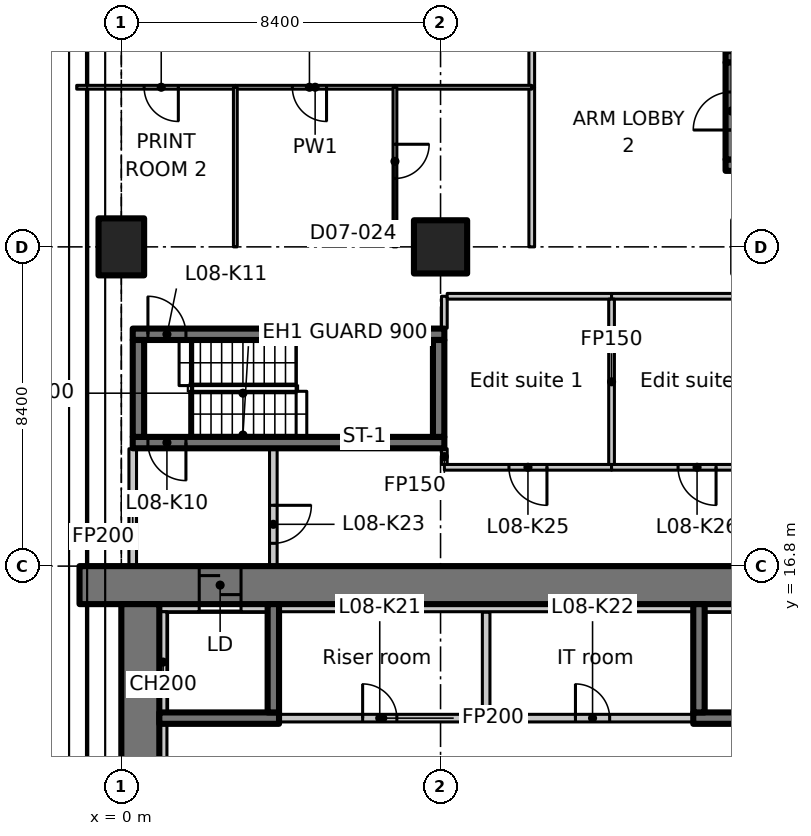
"""IFC4 building model, lengths in metres.
Left out: names, types, materials, properties, quantities, classifications, styles, units other than length and angle.
Written with IfcOpenShell. Run it as: python <this file> out.ifc"""

import sys

from ifc_helpers import new_model, si_unit, direction, frame, frame_2d, origin, origin_2d, place, context, subcontext, project, spatial, rectangle, extrude, element, fill, save


model = new_model("IFC4")
c1 = context("Model", 3, precision=1e-05, world=origin(), true_north=direction((0.0, 1.0)))
c2 = subcontext(c1, "Body", "Model", "MODEL_VIEW")
j1 = project(units=[si_unit("LENGTHUNIT", "METRE"), si_unit("PLANEANGLEUNIT", "RADIAN")], contexts=[c1])
p1 = place(None, origin())
s1 = spatial("IfcSite", under=j1, at=p1, CompositionType="ELEMENT")
p2 = place(p1, origin())
s2 = spatial("IfcBuilding", under=s1, at=p2, CompositionType="ELEMENT")
p3 = place(p2, frame((0.0, 0.0, 43.7)))
s3 = spatial("IfcBuildingStorey", under=s2, at=p3, CompositionType="ELEMENT", Elevation=43.7)
p4 = place(p3, frame((0.0, 25.2, 0.0), z_axis=(0.0, 0.0, 1.0), x_axis=(1.0, 0.0, 0.0)))
e1 = element("IfcColumn", 1, at=p4, inside=s3, PredefinedType="COLUMN", context=c2, shape_type="SweptSolid", body=[
    extrude(rectangle(XDim=1.2, YDim=1.5, at=origin_2d()), origin(), (0.0, 0.0, 1.0), 3.35),
])
p5 = place(p3, frame((8.4, 25.2, 0.0), z_axis=(0.0, 0.0, 1.0), x_axis=(1.0, 0.0, 0.0)))
e2 = element("IfcColumn", 2, at=p5, inside=s3, PredefinedType="COLUMN", context=c2, shape_type="SweptSolid", body=[
    extrude(rectangle(XDim=1.4, YDim=1.4, at=origin_2d()), origin(), (0.0, 0.0, 1.0), 3.35),
])
p6 = place(p3, frame((-1.1, 16.3, 0.0), z_axis=(0.0, 0.0, 1.0), x_axis=(1.0, 0.0, 0.0)))
e3 = element("IfcWall", 3, at=p6, inside=s3, PredefinedType="SHEAR", context=c2, shape_type="SweptSolid", body=[
    extrude(rectangle(XDim=22.1, YDim=1.0, at=frame_2d((11.05, 0.0))), origin(), (0.0, 0.0, 1.0), 3.35),
])
p7 = place(p6, frame((3.15, 0.0, 0.0)))
e4 = element("IfcOpeningElement", 4, at=p7, cuts=e3, PredefinedType="OPENING", context=c2, shape_type="SweptSolid", body=[
    extrude(rectangle(XDim=1.1, YDim=2.3, at=frame_2d((0.55, 1.15))), frame((0.0, 0.51, 0.0), z_axis=(0.0, -1.0, 0.0), x_axis=(1.0, 0.0, 0.0)), (0.0, 0.0, 1.0), 1.02),
])
p8 = place(p3, frame((0.5, 6.936, 0.0), z_axis=(0.0, 0.0, 1.0), x_axis=(0.0, 1.0, 0.0)))
e5 = element("IfcWall", 5, at=p8, inside=s3, PredefinedType="SHEAR", context=c2, shape_type="SweptSolid", body=[
    extrude(rectangle(XDim=8.864, YDim=1.0, at=frame_2d((4.432, 0.0))), origin(), (0.0, 0.0, 1.0), 3.35),
])
p9 = place(p3, frame((1.0, 15.7, 0.0), z_axis=(0.0, 0.0, 1.0), x_axis=(1.0, 0.0, 0.0)))
e6 = element("IfcWall", 6, at=p9, inside=s3, PredefinedType="PARTITIONING", context=c2, shape_type="SweptSolid", body=[
    extrude(rectangle(XDim=1.05, YDim=0.2, at=frame_2d((0.525, 0.0))), origin(), (0.0, 0.0, 1.0), 3.35),
])
p10 = place(p3, frame((1.0, 12.8, 0.0), z_axis=(0.0, 0.0, 1.0), x_axis=(1.0, 0.0, 0.0)))
e7 = element("IfcWall", 7, at=p10, inside=s3, PredefinedType="SHEAR", context=c2, shape_type="SweptSolid", body=[
    extrude(rectangle(XDim=3.15, YDim=0.3, at=frame_2d((1.575, 0.0))), origin(), (0.0, 0.0, 1.0), 3.35),
])
p11 = place(p3, frame((4.0, 12.95, 0.0), z_axis=(0.0, 0.0, 1.0), x_axis=(0.0, 1.0, 0.0)))
e8 = element("IfcWall", 8, at=p11, inside=s3, PredefinedType="SHEAR", context=c2, shape_type="SweptSolid", body=[
    extrude(rectangle(XDim=2.85, YDim=0.3, at=frame_2d((1.425, 0.0))), origin(), (0.0, 0.0, 1.0), 3.35),
])
p12 = place(p3, frame((15.05, 12.8, 0.0), z_axis=(0.0, 0.0, 1.0), x_axis=(1.0, 0.0, 0.0)))
e9 = element("IfcWall", 9, at=p12, inside=s3, PredefinedType="SHEAR", context=c2, shape_type="SweptSolid", body=[
    extrude(rectangle(XDim=5.9, YDim=0.3, at=frame_2d((2.95, 0.0))), origin(), (0.0, 0.0, 1.0), 3.35),
])
p13 = place(p12, frame((3.8, 0.0, 0.0)))
e10 = element("IfcOpeningElement", 10, at=p13, cuts=e9, PredefinedType="OPENING", context=c2, shape_type="SweptSolid", body=[
    extrude(rectangle(XDim=1.1, YDim=2.3, at=frame_2d((0.55, 1.15))), frame((0.0, 0.16, 0.0), z_axis=(0.0, -1.0, 0.0), x_axis=(1.0, 0.0, 0.0)), (0.0, 0.0, 1.0), 0.32),
])
p14 = place(p3, frame((15.2, 12.95, 0.0), z_axis=(0.0, 0.0, 1.0), x_axis=(0.0, 1.0, 0.0)))
e11 = element("IfcWall", 11, at=p14, inside=s3, PredefinedType="SHEAR", context=c2, shape_type="SweptSolid", body=[
    extrude(rectangle(XDim=2.85, YDim=0.3, at=frame_2d((1.425, 0.0))), origin(), (0.0, 0.0, 1.0), 3.35),
])
p15 = place(p3, frame((8.5, 20.05, 0.0), z_axis=(0.0, 0.0, 1.0), x_axis=(-1.0, 0.0, 0.0)))
e12 = element("IfcWall", 12, at=p15, inside=s3, PredefinedType="SHEAR", context=c2, shape_type="SweptSolid", body=[
    extrude(rectangle(XDim=8.2, YDim=0.3, at=frame_2d((4.1, 0.0))), origin(), (0.0, 0.0, 1.0), 3.35),
])
p16 = place(p15, frame((6.8, 0.0, 0.0)))
e13 = element("IfcOpeningElement", 13, at=p16, cuts=e12, PredefinedType="OPENING", context=c2, shape_type="SweptSolid", body=[
    extrude(rectangle(XDim=1.0, YDim=2.1, at=frame_2d((0.5, 1.05))), frame((0.0, 0.16, 0.0), z_axis=(0.0, -1.0, 0.0), x_axis=(1.0, 0.0, 0.0)), (0.0, 0.0, 1.0), 0.32),
])
p17 = place(p3, frame((0.3, 22.9, 0.0), z_axis=(0.0, 0.0, 1.0), x_axis=(1.0, 0.0, 0.0)))
e14 = element("IfcWall", 14, at=p17, inside=s3, PredefinedType="SHEAR", context=c2, shape_type="SweptSolid", body=[
    extrude(rectangle(XDim=8.2, YDim=0.3, at=frame_2d((4.1, 0.0))), origin(), (0.0, 0.0, 1.0), 3.35),
])
p18 = place(p17, frame((0.4, 0.0, 0.0)))
e15 = element("IfcOpeningElement", 15, at=p18, cuts=e14, PredefinedType="OPENING", context=c2, shape_type="SweptSolid", body=[
    extrude(rectangle(XDim=1.0, YDim=2.1, at=frame_2d((0.5, 1.05))), frame((0.0, 0.16, 0.0), z_axis=(0.0, -1.0, 0.0), x_axis=(1.0, 0.0, 0.0)), (0.0, 0.0, 1.0), 0.32),
])
for number, where, z_axis, x_axis in (
    (16, (0.45, 20.2, 0.0), (0.0, 0.0, 1.0), (0.0, 1.0, 0.0)),
    (17, (8.35, 20.2, 0.0), (0.0, 0.0, 1.0), (0.0, 1.0, 0.0)),
):
    element("IfcWall", number, at=place(p3, frame(where, z_axis=z_axis, x_axis=x_axis)), inside=s3, PredefinedType="SHEAR", context=c2, shape_type="SweptSolid", body=[
        extrude(rectangle(XDim=2.55, YDim=0.3, at=frame_2d((1.275, 0.0))), origin(), (0.0, 0.0, 1.0), 3.35),
    ])
for number, where, z_axis, x_axis in (
    (18, (15.9, 27.35, 0.0), (0.0, 0.0, 1.0), (1.0, 0.0, 0.0)),
    (19, (15.9, 30.2, 0.0), (0.0, 0.0, 1.0), (1.0, 0.0, 0.0)),
):
    element("IfcWall", number, at=place(p3, frame(where, z_axis=z_axis, x_axis=x_axis)), inside=s3, PredefinedType="SHEAR", context=c2, shape_type="SweptSolid", body=[
        extrude(rectangle(XDim=8.2, YDim=0.3, at=frame_2d((4.1, 0.0))), origin(), (0.0, 0.0, 1.0), 3.35),
    ])
p19 = place(p3, frame((16.05, 27.5, 0.0), z_axis=(0.0, 0.0, 1.0), x_axis=(0.0, 1.0, 0.0)))
e20 = element("IfcWall", 20, at=p19, inside=s3, PredefinedType="SHEAR", context=c2, shape_type="SweptSolid", body=[
    extrude(rectangle(XDim=2.55, YDim=0.3, at=frame_2d((1.275, 0.0))), origin(), (0.0, 0.0, 1.0), 3.35),
])
p20 = place(p19, frame((0.775, 0.0, 0.0)))
e21 = element("IfcOpeningElement", 21, at=p20, cuts=e20, PredefinedType="OPENING", context=c2, shape_type="SweptSolid", body=[
    extrude(rectangle(XDim=1.0, YDim=2.1, at=frame_2d((0.5, 1.05))), frame((0.0, 0.16, 0.0), z_axis=(0.0, -1.0, 0.0), x_axis=(1.0, 0.0, 0.0)), (0.0, 0.0, 1.0), 0.32),
])
p21 = place(p3, frame((0.3, 16.812, 0.0), z_axis=(0.0, 0.0, 1.0), x_axis=(0.0, 1.0, 0.0)))
e22 = element("IfcWall", 22, at=p21, inside=s3, PredefinedType="PARTITIONING", context=c2, shape_type="SweptSolid", body=[
    extrude(rectangle(XDim=3.076, YDim=0.2, at=frame_2d((1.538, 0.0))), origin(), (0.0, 0.0, 1.0), 2.98),
])
p22 = place(p3, frame((4.0, 19.888, 0.0), z_axis=(0.0, 0.0, 1.0), x_axis=(0.0, -1.0, 0.0)))
e23 = element("IfcWall", 23, at=p22, inside=s3, PredefinedType="PARTITIONING", context=c2, shape_type="SweptSolid", body=[
    extrude(rectangle(XDim=3.076, YDim=0.2, at=frame_2d((1.538, 0.0))), origin(), (0.0, 0.0, 1.0), 3.35),
])
p23 = place(p22, frame((1.488, 0.0, 0.0)))
e24 = element("IfcOpeningElement", 24, at=p23, cuts=e23, PredefinedType="OPENING", context=c2, shape_type="SweptSolid", body=[
    extrude(rectangle(XDim=1.0, YDim=2.1, at=frame_2d((0.5, 1.05))), frame((0.0, 0.11, 0.0), z_axis=(0.0, -1.0, 0.0), x_axis=(1.0, 0.0, 0.0)), (0.0, 0.0, 1.0), 0.22),
])
p24 = place(p3, frame((4.162, 12.8, 0.0), z_axis=(0.0, 0.0, 1.0), x_axis=(1.0, 0.0, 0.0)))
e25 = element("IfcWall", 25, at=p24, inside=s3, PredefinedType="PARTITIONING", context=c2, shape_type="SweptSolid", body=[
    extrude(rectangle(XDim=5.438, YDim=0.2, at=frame_2d((2.719, 0.0))), origin(), (0.0, 0.0, 1.0), 3.35),
])
p25 = place(p24, frame((2.188, 0.0, 0.0)))
e26 = element("IfcOpeningElement", 26, at=p25, cuts=e25, PredefinedType="OPENING", context=c2, shape_type="SweptSolid", body=[
    extrude(rectangle(XDim=0.9, YDim=2.1, at=frame_2d((0.45, 1.05))), frame((0.0, 0.11, 0.0), z_axis=(0.0, -1.0, 0.0), x_axis=(1.0, 0.0, 0.0)), (0.0, 0.0, 1.0), 0.22),
])
p26 = place(p3, frame((9.6, 12.8, 0.0), z_axis=(0.0, 0.0, 1.0), x_axis=(1.0, 0.0, 0.0)))
e27 = element("IfcWall", 27, at=p26, inside=s3, PredefinedType="PARTITIONING", context=c2, shape_type="SweptSolid", body=[
    extrude(rectangle(XDim=5.438, YDim=0.2, at=frame_2d((2.719, 0.0))), origin(), (0.0, 0.0, 1.0), 3.35),
])
p27 = place(p26, frame((2.35, 0.0, 0.0)))
e28 = element("IfcOpeningElement", 28, at=p27, cuts=e27, PredefinedType="OPENING", context=c2, shape_type="SweptSolid", body=[
    extrude(rectangle(XDim=0.9, YDim=2.1, at=frame_2d((0.45, 1.05))), frame((0.0, 0.11, 0.0), z_axis=(0.0, -1.0, 0.0), x_axis=(1.0, 0.0, 0.0)), (0.0, 0.0, 1.0), 0.22),
])
p28 = place(p3, frame((9.6, 15.588, 0.0), z_axis=(0.0, 0.0, 1.0), x_axis=(0.0, -1.0, 0.0)))
e29 = element("IfcWall", 29, at=p28, inside=s3, PredefinedType="PARTITIONING", context=c2, shape_type="SweptSolid", body=[
    extrude(rectangle(XDim=2.688, YDim=0.2, at=frame_2d((1.344, 0.0))), origin(), (0.0, 0.0, 1.0), 3.35),
])
p29 = place(p3, frame((12.9, 19.4, 0.0), z_axis=(0.0, 0.0, 1.0), x_axis=(-1.0, 0.0, 0.0)))
e30 = element("IfcWall", 30, at=p29, inside=s3, PredefinedType="PARTITIONING", context=c2, shape_type="SweptSolid", body=[
    extrude(rectangle(XDim=4.4, YDim=0.15, at=frame_2d((2.2, 0.0))), origin(), (0.0, 0.0, 1.0), 3.35),
])
p30 = place(p29, frame((1.7, 0.0, 0.0)))
e31 = element("IfcOpeningElement", 31, at=p30, cuts=e30, PredefinedType="OPENING", context=c2, shape_type="SweptSolid", body=[
    extrude(rectangle(XDim=1.0, YDim=2.1, at=frame_2d((0.5, 1.05))), frame((0.0, 0.085, 0.0), z_axis=(0.0, -1.0, 0.0), x_axis=(1.0, 0.0, 0.0)), (0.0, 0.0, 1.0), 0.17),
])
p31 = place(p3, frame((8.5, 19.475, 0.0), z_axis=(0.0, 0.0, 1.0), x_axis=(0.0, 1.0, 0.0)))
e32 = element("IfcWall", 32, at=p31, inside=s3, PredefinedType="PARTITIONING", context=c2, shape_type="SweptSolid", body=[
    extrude(rectangle(XDim=0.413, YDim=0.15, at=frame_2d((0.207, 0.0))), origin(), (0.0, 0.0, 1.0), 3.35),
])
p32 = place(p3, frame((8.5, 23.062, 0.0), z_axis=(0.0, 0.0, 1.0), x_axis=(0.0, 1.0, 0.0)))
e33 = element("IfcWall", 33, at=p32, inside=s3, PredefinedType="PARTITIONING", context=c2, shape_type="SweptSolid", body=[
    extrude(rectangle(XDim=0.838, YDim=0.15, at=frame_2d((0.419, 0.0))), origin(), (0.0, 0.0, 1.0), 3.35),
])
p33 = place(p3, frame((8.575, 23.9, 0.0), z_axis=(0.0, 0.0, 1.0), x_axis=(1.0, 0.0, 0.0)))
e34 = element("IfcWall", 34, at=p33, inside=s3, PredefinedType="PARTITIONING", context=c2, shape_type="SweptSolid", body=[
    extrude(rectangle(XDim=4.325, YDim=0.15, at=frame_2d((2.163, 0.0))), origin(), (0.0, 0.0, 1.0), 3.35),
])
p34 = place(p3, frame((12.9, 23.9, 0.0), z_axis=(0.0, 0.0, 1.0), x_axis=(1.0, 0.0, 0.0)))
e35 = element("IfcWall", 35, at=p34, inside=s3, PredefinedType="PARTITIONING", context=c2, shape_type="SweptSolid", body=[
    extrude(rectangle(XDim=4.5, YDim=0.15, at=frame_2d((2.25, 0.0))), origin(), (0.0, 0.0, 1.0), 3.35),
])
p35 = place(p3, frame((17.325, 19.4, 0.0), z_axis=(0.0, 0.0, 1.0), x_axis=(-1.0, 0.0, 0.0)))
e36 = element("IfcWall", 36, at=p35, inside=s3, PredefinedType="PARTITIONING", context=c2, shape_type="SweptSolid", body=[
    extrude(rectangle(XDim=4.425, YDim=0.15, at=frame_2d((2.212, 0.0))), origin(), (0.0, 0.0, 1.0), 3.35),
])
p36 = place(p35, frame((1.675, 0.0, 0.0)))
e37 = element("IfcOpeningElement", 37, at=p36, cuts=e36, PredefinedType="OPENING", context=c2, shape_type="SweptSolid", body=[
    extrude(rectangle(XDim=1.0, YDim=2.1, at=frame_2d((0.5, 1.05))), frame((0.0, 0.085, 0.0), z_axis=(0.0, -1.0, 0.0), x_axis=(1.0, 0.0, 0.0)), (0.0, 0.0, 1.0), 0.17),
])
p37 = place(p3, frame((12.9, 23.825, 0.0), z_axis=(0.0, 0.0, 1.0), x_axis=(0.0, -1.0, 0.0)))
e38 = element("IfcWall", 38, at=p37, inside=s3, PredefinedType="PARTITIONING", context=c2, shape_type="SweptSolid", body=[
    extrude(rectangle(XDim=4.35, YDim=0.15, at=frame_2d((2.175, 0.0))), origin(), (0.0, 0.0, 1.0), 3.35),
])
p38 = place(p3, frame((1.1, 9.75, 0.0), z_axis=(0.0, 0.0, 1.0), x_axis=(0.0, 1.0, 0.0)))
e39 = element("IfcWall", 39, at=p38, inside=s3, PredefinedType="PARTITIONING", context=c2, shape_type="SweptSolid", body=[
    extrude(rectangle(XDim=2.9, YDim=0.2, at=frame_2d((1.45, 0.0))), origin(), (0.0, 0.0, 1.0), 3.35),
])
p39 = place(p3, frame((1.1, 12.95, 0.0), z_axis=(0.0, 0.0, 1.0), x_axis=(0.0, 1.0, 0.0)))
e40 = element("IfcWall", 40, at=p39, inside=s3, PredefinedType="PARTITIONING", context=c2, shape_type="SweptSolid", body=[
    extrude(rectangle(XDim=2.65, YDim=0.2, at=frame_2d((1.325, 0.0))), origin(), (0.0, 0.0, 1.0), 3.35),
])
p40 = place(p3, frame((3.15, 15.7, 0.0), z_axis=(0.0, 0.0, 1.0), x_axis=(1.0, 0.0, 0.0)))
e41 = element("IfcWall", 41, at=p40, inside=s3, PredefinedType="PARTITIONING", context=c2, shape_type="SweptSolid", body=[
    extrude(rectangle(XDim=0.7, YDim=0.2, at=frame_2d((0.35, 0.0))), origin(), (0.0, 0.0, 1.0), 3.35),
])
p41 = place(p3, frame((4.15, 15.7, 0.0), z_axis=(0.0, 0.0, 1.0), x_axis=(1.0, 0.0, 0.0)))
e42 = element("IfcWall", 42, at=p41, inside=s3, PredefinedType="PARTITIONING", context=c2, shape_type="SweptSolid", body=[
    extrude(rectangle(XDim=10.9, YDim=0.2, at=frame_2d((5.45, 0.0))), origin(), (0.0, 0.0, 1.0), 3.35),
])
p42 = place(p3, frame((15.35, 15.7, 0.0), z_axis=(0.0, 0.0, 1.0), x_axis=(1.0, 0.0, 0.0)))
e43 = element("IfcWall", 43, at=p42, inside=s3, PredefinedType="PARTITIONING", context=c2, shape_type="SweptSolid", body=[
    extrude(rectangle(XDim=2.5, YDim=0.2, at=frame_2d((1.25, 0.0))), origin(), (0.0, 0.0, 1.0), 3.35),
])
p43 = place(p3, frame((10.8, 29.4, 0.0), z_axis=(0.0, 0.0, 1.0), x_axis=(0.0, 1.0, 0.0)))
e44 = element("IfcWall", 44, at=p43, inside=s3, PredefinedType="PARTITIONING", context=c2, shape_type="SweptSolid", body=[
    extrude(rectangle(XDim=4.2, YDim=0.15, at=frame_2d((2.1, 0.0))), origin(), (0.0, 0.0, 1.0), 3.33),
])
p44 = place(p43, frame((1.2, 0.0, 0.0)))
e45 = element("IfcOpeningElement", 45, at=p44, cuts=e44, PredefinedType="OPENING", context=c2, shape_type="SweptSolid", body=[
    extrude(rectangle(XDim=1.6, YDim=2.1, at=frame_2d((0.8, 1.05))), frame((0.0, 0.085, 0.0), z_axis=(0.0, -1.0, 0.0), x_axis=(1.0, 0.0, 0.0)), (0.0, 0.0, 1.0), 0.17),
])
p45 = place(p3, frame((10.8, 25.2, 0.0), z_axis=(0.0, 0.0, 1.0), x_axis=(0.0, 1.0, 0.0)))
e46 = element("IfcWall", 46, at=p45, inside=s3, PredefinedType="PARTITIONING", context=c2, shape_type="SweptSolid", body=[
    extrude(rectangle(XDim=4.2, YDim=0.15, at=frame_2d((2.1, 0.0))), origin(), (0.0, 0.0, 1.0), 3.33),
])
p46 = place(p3, frame((3.0, 29.4, 0.0), z_axis=(0.0, 0.0, 1.0), x_axis=(-1.0, 0.0, 0.0)))
e47 = element("IfcWall", 47, at=p46, inside=s3, PredefinedType="PARTITIONING", context=c2, shape_type="SweptSolid", body=[
    extrude(rectangle(XDim=4.174, YDim=0.1, at=frame_2d((2.087, 0.0))), origin(), (0.0, 0.0, 1.0), 2.98),
])
p47 = place(p46, frame((1.5, 0.0, 0.0)))
e48 = element("IfcOpeningElement", 48, at=p47, cuts=e47, PredefinedType="OPENING", context=c2, shape_type="SweptSolid", body=[
    extrude(rectangle(XDim=0.9, YDim=2.1, at=frame_2d((0.45, 1.05))), frame((0.0, 0.06, 0.0), z_axis=(0.0, -1.0, 0.0), x_axis=(1.0, 0.0, 0.0)), (0.0, 0.0, 1.0), 0.12),
])
p48 = place(p3, frame((7.2, 29.4, 0.0), z_axis=(0.0, 0.0, 1.0), x_axis=(-1.0, 0.0, 0.0)))
e49 = element("IfcWall", 49, at=p48, inside=s3, PredefinedType="PARTITIONING", context=c2, shape_type="SweptSolid", body=[
    extrude(rectangle(XDim=4.2, YDim=0.1, at=frame_2d((2.1, 0.0))), origin(), (0.0, 0.0, 1.0), 3.33),
])
p49 = place(p48, frame((1.8, 0.0, 0.0)))
e50 = element("IfcOpeningElement", 50, at=p49, cuts=e49, PredefinedType="OPENING", context=c2, shape_type="SweptSolid", body=[
    extrude(rectangle(XDim=0.9, YDim=2.1, at=frame_2d((0.45, 1.05))), frame((0.0, 0.06, 0.0), z_axis=(0.0, -1.0, 0.0), x_axis=(1.0, 0.0, 0.0)), (0.0, 0.0, 1.0), 0.12),
])
p50 = place(p3, frame((10.8, 29.4, 0.0), z_axis=(0.0, 0.0, 1.0), x_axis=(-1.0, 0.0, 0.0)))
e51 = element("IfcWall", 51, at=p50, inside=s3, PredefinedType="PARTITIONING", context=c2, shape_type="SweptSolid", body=[
    extrude(rectangle(XDim=3.6, YDim=0.1, at=frame_2d((1.8, 0.0))), origin(), (0.0, 0.0, 1.0), 3.33),
])
p51 = place(p3, frame((3.0, 29.4, 0.0), z_axis=(0.0, 0.0, 1.0), x_axis=(0.0, -1.0, 0.0)))
e52 = element("IfcWall", 52, at=p51, inside=s3, PredefinedType="PARTITIONING", context=c2, shape_type="SweptSolid", body=[
    extrude(rectangle(XDim=4.2, YDim=0.1, at=frame_2d((2.1, 0.0))), origin(), (0.0, 0.0, 1.0), 3.33),
])
p52 = place(p3, frame((7.2, 29.4, 0.0), z_axis=(0.0, 0.0, 1.0), x_axis=(0.0, -1.0, 0.0)))
e53 = element("IfcWall", 53, at=p52, inside=s3, PredefinedType="PARTITIONING", context=c2, shape_type="SweptSolid", body=[
    extrude(rectangle(XDim=4.2, YDim=0.1, at=frame_2d((2.1, 0.0))), origin(), (0.0, 0.0, 1.0), 3.33),
])
p53 = place(p52, frame((1.5, 0.0, 0.0)))
e54 = element("IfcOpeningElement", 54, at=p53, cuts=e53, PredefinedType="OPENING", context=c2, shape_type="SweptSolid", body=[
    extrude(rectangle(XDim=0.9, YDim=2.1, at=frame_2d((0.45, 1.05))), frame((0.0, 0.06, 0.0), z_axis=(0.0, -1.0, 0.0), x_axis=(1.0, 0.0, 0.0)), (0.0, 0.0, 1.0), 0.12),
])
p54 = place(p7, origin())
e55 = element("IfcDoor", 55, at=p54, inside=s3, OperationType="SLIDING_TO_LEFT", PredefinedType="DOOR", context=c2, shape_type="SweptSolid", body=[
    extrude(rectangle(XDim=1.1, YDim=2.3, at=frame_2d((0.55, 1.15))), frame((0.0, 0.025, 0.0), z_axis=(0.0, -1.0, 0.0), x_axis=(1.0, 0.0, 0.0)), (0.0, 0.0, 1.0), 0.05),
])
fill(e4, e55)
p55 = place(p16, origin())
e56 = element("IfcDoor", 56, at=p55, inside=s3, OperationType="SINGLE_SWING_RIGHT", PredefinedType="DOOR", context=c2, shape_type="SweptSolid", body=[
    extrude(rectangle(XDim=1.0, YDim=2.1, at=frame_2d((0.5, 1.05))), frame((0.0, 0.025, 0.0), z_axis=(0.0, -1.0, 0.0), x_axis=(1.0, 0.0, 0.0)), (0.0, 0.0, 1.0), 0.05),
])
fill(e13, e56)
p56 = place(p18, origin())
e57 = element("IfcDoor", 57, at=p56, inside=s3, OperationType="SINGLE_SWING_LEFT", PredefinedType="DOOR", context=c2, shape_type="SweptSolid", body=[
    extrude(rectangle(XDim=1.0, YDim=2.1, at=frame_2d((0.5, 1.05))), frame((0.0, 0.025, 0.0), z_axis=(0.0, -1.0, 0.0), x_axis=(1.0, 0.0, 0.0)), (0.0, 0.0, 1.0), 0.05),
])
fill(e15, e57)
p57 = place(p20, origin())
e58 = element("IfcDoor", 58, at=p57, inside=s3, OperationType="SINGLE_SWING_RIGHT", PredefinedType="DOOR", context=c2, shape_type="SweptSolid", body=[
    extrude(rectangle(XDim=1.0, YDim=2.1, at=frame_2d((0.5, 1.05))), frame((0.0, 0.025, 0.0), z_axis=(0.0, -1.0, 0.0), x_axis=(1.0, 0.0, 0.0)), (0.0, 0.0, 1.0), 0.05),
])
fill(e21, e58)
p58 = place(p25, origin())
e59 = element("IfcDoor", 59, at=p58, inside=s3, OperationType="SINGLE_SWING_LEFT", PredefinedType="DOOR", context=c2, shape_type="SweptSolid", body=[
    extrude(rectangle(XDim=0.9, YDim=2.1, at=frame_2d((0.45, 1.05))), frame((0.0, 0.025, 0.0), z_axis=(0.0, -1.0, 0.0), x_axis=(1.0, 0.0, 0.0)), (0.0, 0.0, 1.0), 0.05),
])
fill(e26, e59)
p59 = place(p27, origin())
e60 = element("IfcDoor", 60, at=p59, inside=s3, OperationType="SINGLE_SWING_RIGHT", PredefinedType="DOOR", context=c2, shape_type="SweptSolid", body=[
    extrude(rectangle(XDim=0.9, YDim=2.1, at=frame_2d((0.45, 1.05))), frame((0.0, 0.025, 0.0), z_axis=(0.0, -1.0, 0.0), x_axis=(1.0, 0.0, 0.0)), (0.0, 0.0, 1.0), 0.05),
])
fill(e28, e60)
p60 = place(p23, origin())
e61 = element("IfcDoor", 61, at=p60, inside=s3, OperationType="SINGLE_SWING_LEFT", PredefinedType="DOOR", context=c2, shape_type="SweptSolid", body=[
    extrude(rectangle(XDim=1.0, YDim=2.1, at=frame_2d((0.5, 1.05))), frame((0.0, 0.025, 0.0), z_axis=(0.0, -1.0, 0.0), x_axis=(1.0, 0.0, 0.0)), (0.0, 0.0, 1.0), 0.05),
])
fill(e24, e61)
p61 = place(p30, origin())
e62 = element("IfcDoor", 62, at=p61, inside=s3, OperationType="SINGLE_SWING_LEFT", PredefinedType="DOOR", context=c2, shape_type="SweptSolid", body=[
    extrude(rectangle(XDim=1.0, YDim=2.1, at=frame_2d((0.5, 1.05))), frame((0.0, 0.025, 0.0), z_axis=(0.0, -1.0, 0.0), x_axis=(1.0, 0.0, 0.0)), (0.0, 0.0, 1.0), 0.05),
])
fill(e31, e62)
p62 = place(p36, origin())
e63 = element("IfcDoor", 63, at=p62, inside=s3, OperationType="SINGLE_SWING_RIGHT", PredefinedType="DOOR", context=c2, shape_type="SweptSolid", body=[
    extrude(rectangle(XDim=1.0, YDim=2.1, at=frame_2d((0.5, 1.05))), frame((0.0, 0.025, 0.0), z_axis=(0.0, -1.0, 0.0), x_axis=(1.0, 0.0, 0.0)), (0.0, 0.0, 1.0), 0.05),
])
fill(e37, e63)
p63 = place(p47, origin())
e64 = element("IfcDoor", 64, at=p63, inside=s3, OperationType="SINGLE_SWING_LEFT", PredefinedType="DOOR", context=c2, shape_type="SweptSolid", body=[
    extrude(rectangle(XDim=0.9, YDim=2.1, at=frame_2d((0.45, 1.05))), frame((0.0, 0.025, 0.0), z_axis=(0.0, -1.0, 0.0), x_axis=(1.0, 0.0, 0.0)), (0.0, 0.0, 1.0), 0.05),
])
fill(e48, e64)
p64 = place(p49, origin())
e65 = element("IfcDoor", 65, at=p64, inside=s3, OperationType="SINGLE_SWING_LEFT", PredefinedType="DOOR", context=c2, shape_type="SweptSolid", body=[
    extrude(rectangle(XDim=0.9, YDim=2.1, at=frame_2d((0.45, 1.05))), frame((0.0, 0.025, 0.0), z_axis=(0.0, -1.0, 0.0), x_axis=(1.0, 0.0, 0.0)), (0.0, 0.0, 1.0), 0.05),
])
fill(e50, e65)
p65 = place(p53, origin())
e66 = element("IfcDoor", 66, at=p65, inside=s3, OperationType="SINGLE_SWING_LEFT", PredefinedType="DOOR", context=c2, shape_type="SweptSolid", body=[
    extrude(rectangle(XDim=0.9, YDim=2.1, at=frame_2d((0.45, 1.05))), frame((0.0, 0.025, 0.0), z_axis=(0.0, -1.0, 0.0), x_axis=(1.0, 0.0, 0.0)), (0.0, 0.0, 1.0), 0.05),
])
fill(e54, e66)
save(model, sys.argv[1])
